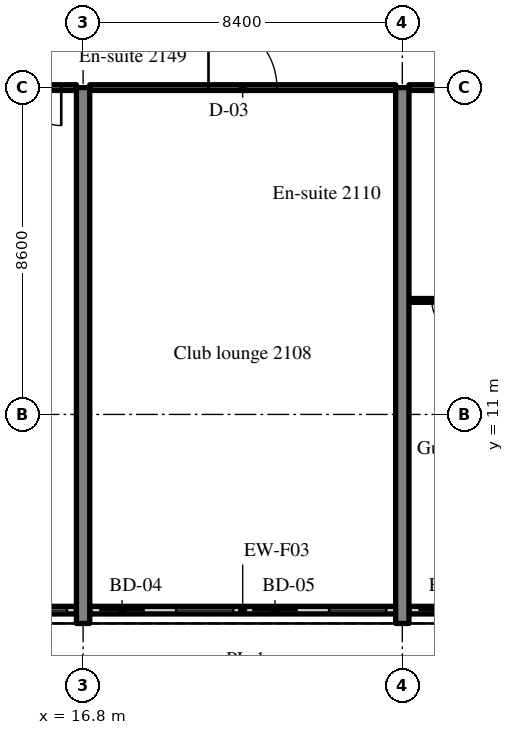
"""IFC4 building model, lengths in metres.
Left out: names, types, materials, properties, quantities, classifications, styles, units other than length and angle.
Written with IfcOpenShell. Run it as: python <this file> out.ifc"""

import sys

from ifc_helpers import new_model, si_unit, direction, frame, frame_2d, origin, place, context, subcontext, project, spatial, rectangle, extrude, source, transform, mapped, element, fill, save


model = new_model("IFC4")
c1 = context("Model", 3, precision=1e-05, world=origin(), true_north=direction((0.0, 1.0)))
c2 = subcontext(c1, "Body", "Model", "MODEL_VIEW")
j1 = project(units=[si_unit("LENGTHUNIT", "METRE"), si_unit("PLANEANGLEUNIT", "RADIAN")], contexts=[c1])
p1 = place(None, origin())
s1 = spatial("IfcSite", under=j1, at=p1, CompositionType="ELEMENT")
p2 = place(p1, origin())
s2 = spatial("IfcBuilding", under=s1, at=p2, CompositionType="ELEMENT")
p3 = place(p2, frame((0.0, 0.0, 91.4)))
s3 = spatial("IfcBuildingStorey", under=s2, at=p3, CompositionType="ELEMENT", Elevation=91.4)
m1 = source(origin(), c2, "Body", "SweptSolid", [
    extrude(rectangle(XDim=14.1, YDim=0.35, at=frame_2d((7.05, 0.0))), origin(), (0.0, 0.0, 1.0), 3.52),
])
for number, where, z_axis, x_axis in (
    (1, (16.8, 5.5, 0.0), (0.0, 0.0, 1.0), (0.0, 1.0, 0.0)),
    (2, (25.2, 5.5, 0.0), (0.0, 0.0, 1.0), (0.0, 1.0, 0.0)),
):
    element("IfcWall", number, at=place(p3, frame(where, z_axis=z_axis, x_axis=x_axis)), inside=s3, PredefinedType="SHEAR", context=c2, shape_type="MappedRepresentation", body=[
        mapped(m1, transform((0.0, 0.0, 0.0), scale=1.0)),
    ])
m2 = source(origin(), c2, "Body", "SweptSolid", [
    extrude(rectangle(XDim=8.05, YDim=0.2, at=frame_2d((4.025, 0.0))), origin(), (0.0, 0.0, 1.0), 2.82),
])
p4 = place(p3, frame((8.575, 5.85, 0.0), z_axis=(0.0, 0.0, 1.0), x_axis=(1.0, 0.0, 0.0)))
e3 = element("IfcWall", 3, at=p4, inside=s3, PredefinedType="SOLIDWALL", context=c2, shape_type="MappedRepresentation", body=[
    mapped(m2, transform((0.0, 0.0, 0.0), scale=1.0)),
])
m3 = source(origin(), c2, "Body", "SweptSolid", [
    extrude(rectangle(XDim=1.2, YDim=2.4, at=frame_2d((0.6, 1.2))), frame((0.0, 0.11, 0.0), z_axis=(0.0, -1.0, 0.0), x_axis=(1.0, 0.0, 0.0)), (0.0, 0.0, 1.0), 0.22),
])
p5 = place(p4, frame((0.25, 0.0, 0.0)))
e4 = element("IfcOpeningElement", 4, at=p5, cuts=e3, PredefinedType="OPENING", context=c2, shape_type="MappedRepresentation", body=[
    mapped(m3, transform((0.0, 0.0, 0.0), scale=1.0)),
])
m4 = source(origin(), c2, "Body", "SweptSolid", [
    extrude(rectangle(XDim=1.5, YDim=1.5, at=frame_2d((0.75, 0.75))), frame((0.0, 0.11, 0.0), z_axis=(0.0, -1.0, 0.0), x_axis=(1.0, 0.0, 0.0)), (0.0, 0.0, 1.0), 0.22),
])
p6 = place(p4, frame((2.275, 0.0, 0.9)))
e5 = element("IfcOpeningElement", 5, at=p6, cuts=e3, PredefinedType="OPENING", context=c2, shape_type="MappedRepresentation", body=[
    mapped(m4, transform((0.0, 0.0, 0.0), scale=1.0)),
])
p7 = place(p4, frame((4.275, 0.0, 0.0)))
e6 = element("IfcOpeningElement", 6, at=p7, cuts=e3, PredefinedType="OPENING", context=c2, shape_type="MappedRepresentation", body=[
    mapped(m3, transform((0.0, 0.0, 0.0), scale=1.0)),
])
p8 = place(p4, frame((6.3, 0.0, 0.9)))
e7 = element("IfcOpeningElement", 7, at=p8, cuts=e3, PredefinedType="OPENING", context=c2, shape_type="MappedRepresentation", body=[
    mapped(m4, transform((0.0, 0.0, 0.0), scale=1.0)),
])
m5 = source(origin(), c2, "Body", "SweptSolid", [
    extrude(rectangle(XDim=8.05, YDim=0.2, at=frame_2d((4.025, 0.0))), origin(), (0.0, 0.0, 1.0), 2.82),
])
p9 = place(p3, frame((16.975, 5.85, 0.0), z_axis=(0.0, 0.0, 1.0), x_axis=(1.0, 0.0, 0.0)))
e8 = element("IfcWall", 8, at=p9, inside=s3, PredefinedType="SOLIDWALL", context=c2, shape_type="MappedRepresentation", body=[
    mapped(m5, transform((0.0, 0.0, 0.0), scale=1.0)),
])
p10 = place(p9, frame((0.25, 0.0, 0.0)))
e9 = element("IfcOpeningElement", 9, at=p10, cuts=e8, PredefinedType="OPENING", context=c2, shape_type="MappedRepresentation", body=[
    mapped(m3, transform((0.0, 0.0, 0.0), scale=1.0)),
])
p11 = place(p9, frame((2.275, 0.0, 0.9)))
e10 = element("IfcOpeningElement", 10, at=p11, cuts=e8, PredefinedType="OPENING", context=c2, shape_type="MappedRepresentation", body=[
    mapped(m4, transform((0.0, 0.0, 0.0), scale=1.0)),
])
p12 = place(p9, frame((4.275, 0.0, 0.0)))
e11 = element("IfcOpeningElement", 11, at=p12, cuts=e8, PredefinedType="OPENING", context=c2, shape_type="MappedRepresentation", body=[
    mapped(m3, transform((0.0, 0.0, 0.0), scale=1.0)),
])
p13 = place(p9, frame((6.3, 0.0, 0.9)))
e12 = element("IfcOpeningElement", 12, at=p13, cuts=e8, PredefinedType="OPENING", context=c2, shape_type="MappedRepresentation", body=[
    mapped(m4, transform((0.0, 0.0, 0.0), scale=1.0)),
])
p14 = place(p3, frame((25.375, 5.85, 0.0), z_axis=(0.0, 0.0, 1.0), x_axis=(1.0, 0.0, 0.0)))
e13 = element("IfcWall", 13, at=p14, inside=s3, PredefinedType="SOLIDWALL", context=c2, shape_type="MappedRepresentation", body=[
    mapped(m2, transform((0.0, 0.0, 0.0), scale=1.0)),
])
p15 = place(p14, frame((0.25, 0.0, 0.0)))
e14 = element("IfcOpeningElement", 14, at=p15, cuts=e13, PredefinedType="OPENING", context=c2, shape_type="MappedRepresentation", body=[
    mapped(m3, transform((0.0, 0.0, 0.0), scale=1.0)),
])
p16 = place(p14, frame((2.275, 0.0, 0.9)))
e15 = element("IfcOpeningElement", 15, at=p16, cuts=e13, PredefinedType="OPENING", context=c2, shape_type="MappedRepresentation", body=[
    mapped(m4, transform((0.0, 0.0, 0.0), scale=1.0)),
])
p17 = place(p14, frame((4.275, 0.0, 0.0)))
e16 = element("IfcOpeningElement", 16, at=p17, cuts=e13, PredefinedType="OPENING", context=c2, shape_type="MappedRepresentation", body=[
    mapped(m3, transform((0.0, 0.0, 0.0), scale=1.0)),
])
p18 = place(p14, frame((6.3, 0.0, 0.9)))
e17 = element("IfcOpeningElement", 17, at=p18, cuts=e13, PredefinedType="OPENING", context=c2, shape_type="MappedRepresentation", body=[
    mapped(m4, transform((0.0, 0.0, 0.0), scale=1.0)),
])
m6 = source(origin(), c2, "Body", "SweptSolid", [
    extrude(rectangle(XDim=8.05, YDim=0.15, at=frame_2d((4.025, 0.0))), origin(), (0.0, 0.0, 1.0), 2.82),
])
p19 = place(p3, frame((8.575, 19.6, 0.0), z_axis=(0.0, 0.0, 1.0), x_axis=(1.0, 0.0, 0.0)))
e18 = element("IfcWall", 18, at=p19, inside=s3, PredefinedType="PARTITIONING", context=c2, shape_type="MappedRepresentation", body=[
    mapped(m6, transform((0.0, 0.0, 0.0), scale=1.0)),
])
m7 = source(origin(), c2, "Body", "SweptSolid", [
    extrude(rectangle(XDim=1.0, YDim=2.1, at=frame_2d((0.5, 1.05))), frame((0.0, 0.085, 0.0), z_axis=(0.0, -1.0, 0.0), x_axis=(1.0, 0.0, 0.0)), (0.0, 0.0, 1.0), 0.17),
])
p20 = place(p19, frame((6.65, 0.0, 0.0)))
e19 = element("IfcOpeningElement", 19, at=p20, cuts=e18, PredefinedType="OPENING", context=c2, shape_type="MappedRepresentation", body=[
    mapped(m7, transform((0.0, 0.0, 0.0), scale=1.0)),
])
m8 = source(origin(), c2, "Body", "SweptSolid", [
    extrude(rectangle(XDim=8.05, YDim=0.15, at=frame_2d((4.025, 0.0))), origin(), (0.0, 0.0, 1.0), 2.82),
])
p21 = place(p3, frame((16.975, 19.6, 0.0), z_axis=(0.0, 0.0, 1.0), x_axis=(1.0, 0.0, 0.0)))
e20 = element("IfcWall", 20, at=p21, inside=s3, PredefinedType="PARTITIONING", context=c2, shape_type="MappedRepresentation", body=[
    mapped(m8, transform((0.0, 0.0, 0.0), scale=1.0)),
])
m9 = source(origin(), c2, "Body", "SweptSolid", [
    extrude(rectangle(XDim=1.8, YDim=2.1, at=frame_2d((0.9, 1.05))), frame((0.0, 0.085, 0.0), z_axis=(0.0, -1.0, 0.0), x_axis=(1.0, 0.0, 0.0)), (0.0, 0.0, 1.0), 0.17),
])
p22 = place(p21, frame((3.125, 0.0, 0.0)))
e21 = element("IfcOpeningElement", 21, at=p22, cuts=e20, PredefinedType="OPENING", context=c2, shape_type="MappedRepresentation", body=[
    mapped(m9, transform((0.0, 0.0, 0.0), scale=1.0)),
])
m10 = source(origin(), c2, "Body", "SweptSolid", [
    extrude(rectangle(XDim=2.1, YDim=0.1, at=frame_2d((1.05, 0.0))), origin(), (0.0, 0.0, 1.0), 3.52),
])
p23 = place(p3, frame((25.375, 14.0, 0.0), z_axis=(0.0, 0.0, 1.0), x_axis=(1.0, 0.0, 0.0)))
e22 = element("IfcWall", 22, at=p23, inside=s3, PredefinedType="PARTITIONING", context=c2, shape_type="MappedRepresentation", body=[
    mapped(m10, transform((0.0, 0.0, 0.0), scale=1.0)),
])
m11 = source(origin(), c2, "Body", "SweptSolid", [
    extrude(rectangle(XDim=0.9, YDim=2.1, at=frame_2d((0.45, 1.05))), frame((0.0, 0.06, 0.0), z_axis=(0.0, -1.0, 0.0), x_axis=(1.0, 0.0, 0.0)), (0.0, 0.0, 1.0), 0.12),
])
p24 = place(p23, frame((0.6, 0.0, 0.0)))
e23 = element("IfcOpeningElement", 23, at=p24, cuts=e22, PredefinedType="OPENING", context=c2, shape_type="MappedRepresentation", body=[
    mapped(m11, transform((0.0, 0.0, 0.0), scale=1.0)),
])
m12 = source(origin(), c2, "Body", "SweptSolid", [
    extrude(rectangle(XDim=3.95, YDim=0.15, at=frame_2d((1.975, 0.0))), origin(), (0.0, 0.0, 1.0), 2.82),
])
p25 = place(p3, frame((25.375, 19.6, 0.0), z_axis=(0.0, 0.0, 1.0), x_axis=(1.0, 0.0, 0.0)))
e24 = element("IfcWall", 24, at=p25, inside=s3, PredefinedType="PARTITIONING", context=c2, shape_type="MappedRepresentation", body=[
    mapped(m12, transform((0.0, 0.0, 0.0), scale=1.0)),
])
p26 = place(p25, frame((2.55, 0.0, 0.0)))
e25 = element("IfcOpeningElement", 25, at=p26, cuts=e24, PredefinedType="OPENING", context=c2, shape_type="MappedRepresentation", body=[
    mapped(m7, transform((0.0, 0.0, 0.0), scale=1.0)),
])
m13 = source(origin(), c2, "Body", "SweptSolid", [
    extrude(rectangle(XDim=1.5, YDim=1.5, at=frame_2d((0.75, 0.75))), frame((0.0, 0.03, 0.0), z_axis=(0.0, -1.0, 0.0), x_axis=(1.0, 0.0, 0.0)), (0.0, 0.0, 1.0), 0.06),
])
p27 = place(p8, origin())
e26 = element("IfcWindow", 26, at=p27, inside=s3, PartitioningType="SINGLE_PANEL", PredefinedType="WINDOW", context=c2, shape_type="MappedRepresentation", body=[
    mapped(m13, transform((0.0, 0.0, 0.0), scale=1.0)),
])
fill(e7, e26)
m14 = source(origin(), c2, "Body", "SweptSolid", [
    extrude(rectangle(XDim=1.2, YDim=2.4, at=frame_2d((0.6, 1.2))), frame((0.0, 0.025, 0.0), z_axis=(0.0, -1.0, 0.0), x_axis=(1.0, 0.0, 0.0)), (0.0, 0.0, 1.0), 0.05),
])
p28 = place(p10, origin())
e27 = element("IfcDoor", 27, at=p28, inside=s3, OperationType="SLIDING_TO_RIGHT", PredefinedType="DOOR", context=c2, shape_type="MappedRepresentation", body=[
    mapped(m14, transform((0.0, 0.0, 0.0), scale=1.0)),
])
fill(e9, e27)
p29 = place(p11, origin())
e28 = element("IfcWindow", 28, at=p29, inside=s3, PartitioningType="SINGLE_PANEL", PredefinedType="WINDOW", context=c2, shape_type="MappedRepresentation", body=[
    mapped(m13, transform((0.0, 0.0, 0.0), scale=1.0)),
])
fill(e10, e28)
p30 = place(p12, origin())
e29 = element("IfcDoor", 29, at=p30, inside=s3, OperationType="SLIDING_TO_LEFT", PredefinedType="DOOR", context=c2, shape_type="MappedRepresentation", body=[
    mapped(m14, transform((0.0, 0.0, 0.0), scale=1.0)),
])
fill(e11, e29)
p31 = place(p13, origin())
e30 = element("IfcWindow", 30, at=p31, inside=s3, PartitioningType="SINGLE_PANEL", PredefinedType="WINDOW", context=c2, shape_type="MappedRepresentation", body=[
    mapped(m13, transform((0.0, 0.0, 0.0), scale=1.0)),
])
fill(e12, e30)
p32 = place(p15, origin())
e31 = element("IfcDoor", 31, at=p32, inside=s3, OperationType="SLIDING_TO_RIGHT", PredefinedType="DOOR", context=c2, shape_type="MappedRepresentation", body=[
    mapped(m14, transform((0.0, 0.0, 0.0), scale=1.0)),
])
fill(e14, e31)
m15 = source(origin(), c2, "Body", "SweptSolid", [
    extrude(rectangle(XDim=1.0, YDim=2.1, at=frame_2d((0.5, 1.05))), frame((0.0, 0.025, 0.0), z_axis=(0.0, -1.0, 0.0), x_axis=(1.0, 0.0, 0.0)), (0.0, 0.0, 1.0), 0.05),
])
p33 = place(p20, origin())
e32 = element("IfcDoor", 32, at=p33, inside=s3, OperationType="SINGLE_SWING_RIGHT", PredefinedType="DOOR", context=c2, shape_type="MappedRepresentation", body=[
    mapped(m15, transform((0.0, 0.0, 0.0), scale=1.0)),
])
fill(e19, e32)
m16 = source(origin(), c2, "Body", "SweptSolid", [
    extrude(rectangle(XDim=1.8, YDim=2.1, at=frame_2d((0.9, 1.05))), frame((0.0, 0.025, 0.0), z_axis=(0.0, -1.0, 0.0), x_axis=(1.0, 0.0, 0.0)), (0.0, 0.0, 1.0), 0.05),
])
p34 = place(p22, origin())
e33 = element("IfcDoor", 33, at=p34, inside=s3, OperationType="DOUBLE_DOOR_SINGLE_SWING", PredefinedType="DOOR", context=c2, shape_type="MappedRepresentation", body=[
    mapped(m16, transform((0.0, 0.0, 0.0), scale=1.0)),
])
fill(e21, e33)
m17 = source(origin(), c2, "Body", "SweptSolid", [
    extrude(rectangle(XDim=0.9, YDim=2.1, at=frame_2d((0.45, 1.05))), frame((0.0, 0.025, 0.0), z_axis=(0.0, -1.0, 0.0), x_axis=(1.0, 0.0, 0.0)), (0.0, 0.0, 1.0), 0.05),
])
p35 = place(p24, origin())
e34 = element("IfcDoor", 34, at=p35, inside=s3, OperationType="SINGLE_SWING_RIGHT", PredefinedType="DOOR", context=c2, shape_type="MappedRepresentation", body=[
    mapped(m17, transform((0.0, 0.0, 0.0), scale=1.0)),
])
fill(e23, e34)
save(model, sys.argv[1])
